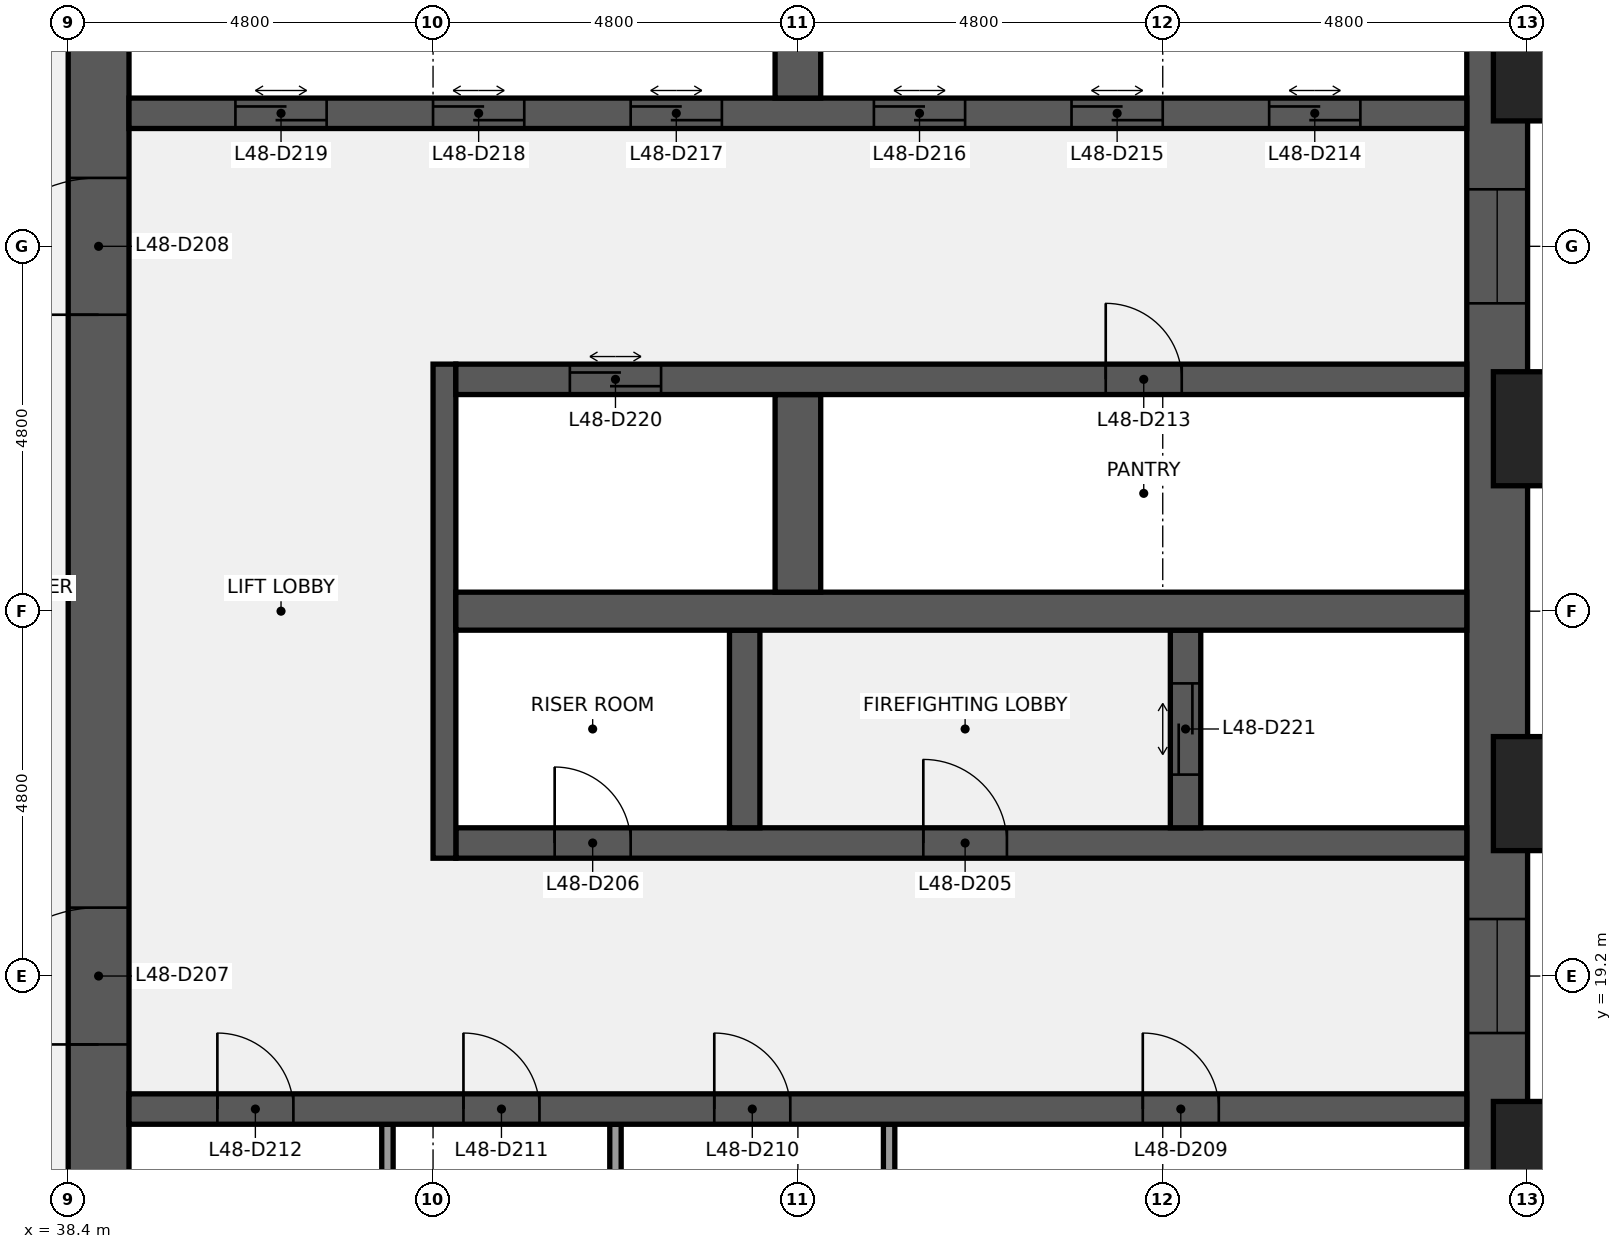
"""IFC4 building model, lengths in metres.
Left out: names, types, materials, properties, quantities, classifications, styles, units other than length and angle.
Written with IfcOpenShell. Run it as: python <this file> out.ifc"""

import sys

from ifc_helpers import new_model, si_unit, direction, frame, frame_2d, origin, origin_2d, place, context, subcontext, project, spatial, rectangle, extrude, element, fill, save


model = new_model("IFC4")
c1 = context("Model", 3, precision=1e-05, world=origin(), true_north=direction((0.0, 1.0)))
c2 = subcontext(c1, "Body", "Model", "MODEL_VIEW")
j1 = project(units=[si_unit("LENGTHUNIT", "METRE"), si_unit("PLANEANGLEUNIT", "RADIAN")], contexts=[c1])
p1 = place(None, origin())
s1 = spatial("IfcSite", under=j1, at=p1, CompositionType="ELEMENT")
p2 = place(p1, origin())
s2 = spatial("IfcBuilding", under=s1, at=p2, CompositionType="ELEMENT")
p3 = place(p2, frame((0.0, 0.0, 221.2)))
s3 = spatial("IfcBuildingStorey", under=s2, at=p3, CompositionType="ELEMENT", Elevation=221.2)
p4 = place(p3, frame((57.2, 38.4, 0.0), z_axis=(0.0, 0.0, 1.0), x_axis=(0.0, -1.0, 0.0)))
e1 = element("IfcWall", 1, at=p4, inside=s3, PredefinedType="SHEAR", context=c2, shape_type="SweptSolid", body=[
    extrude(rectangle(XDim=28.8, YDim=0.8, at=frame_2d((14.4, 0.0))), origin(), (0.0, 0.0, 1.0), 3.84),
])
p5 = place(p4, frame((18.45, 0.0, 0.9)))
e2 = element("IfcOpeningElement", 2, at=p5, cuts=e1, PredefinedType="OPENING", context=c2, shape_type="SweptSolid", body=[
    extrude(rectangle(XDim=1.5, YDim=1.5, at=frame_2d((0.75, 0.75))), frame((0.0, 0.41, 0.0), z_axis=(0.0, -1.0, 0.0), x_axis=(1.0, 0.0, 0.0)), (0.0, 0.0, 1.0), 0.82),
])
p6 = place(p4, frame((8.85, 0.0, 0.9)))
e3 = element("IfcOpeningElement", 3, at=p6, cuts=e1, PredefinedType="OPENING", context=c2, shape_type="SweptSolid", body=[
    extrude(rectangle(XDim=1.5, YDim=1.5, at=frame_2d((0.75, 0.75))), frame((0.0, 0.41, 0.0), z_axis=(0.0, -1.0, 0.0), x_axis=(1.0, 0.0, 0.0)), (0.0, 0.0, 1.0), 0.82),
])
p7 = place(p3, frame((38.8, 9.6, 0.0), z_axis=(0.0, 0.0, 1.0), x_axis=(0.0, 1.0, 0.0)))
e4 = element("IfcWall", 4, at=p7, inside=s3, PredefinedType="SHEAR", context=c2, shape_type="SweptSolid", body=[
    extrude(rectangle(XDim=28.8, YDim=0.8, at=frame_2d((14.4, 0.0))), origin(), (0.0, 0.0, 1.0), 3.84),
])
p8 = place(p7, frame((8.7, 0.0, 0.0)))
e5 = element("IfcOpeningElement", 5, at=p8, cuts=e4, PredefinedType="OPENING", context=c2, shape_type="SweptSolid", body=[
    extrude(rectangle(XDim=1.8, YDim=2.1, at=frame_2d((0.9, 1.05))), frame((0.0, 0.41, 0.0), z_axis=(0.0, -1.0, 0.0), x_axis=(1.0, 0.0, 0.0)), (0.0, 0.0, 1.0), 0.82),
])
p9 = place(p7, frame((18.3, 0.0, 0.0)))
e6 = element("IfcOpeningElement", 6, at=p9, cuts=e4, PredefinedType="OPENING", context=c2, shape_type="SweptSolid", body=[
    extrude(rectangle(XDim=1.8, YDim=2.1, at=frame_2d((0.9, 1.05))), frame((0.0, 0.41, 0.0), z_axis=(0.0, -1.0, 0.0), x_axis=(1.0, 0.0, 0.0)), (0.0, 0.0, 1.0), 0.82),
])
for number, where, z_axis, x_axis in (
    (7, (49.2, 14.65, 0.0), (0.0, 0.0, 1.0), (0.0, 1.0, 0.0)),
    (8, (45.6, 14.65, 0.0), (0.0, 0.0, 1.0), (0.0, 1.0, 0.0)),
    (9, (42.6, 14.65, 0.0), (0.0, 0.0, 1.0), (0.0, 1.0, 0.0)),
):
    element("IfcWall", number, at=place(p3, frame(where, z_axis=z_axis, x_axis=x_axis)), inside=s3, PredefinedType="PARTITIONING", context=c2, shape_type="SweptSolid", body=[
        extrude(rectangle(XDim=2.6, YDim=0.15, at=frame_2d((1.3, 0.0))), origin(), (0.0, 0.0, 1.0), 3.84),
    ])
p10 = place(p3, frame((39.2, 17.45, 0.0), z_axis=(0.0, 0.0, 1.0), x_axis=(1.0, 0.0, 0.0)))
e10 = element("IfcWall", 10, at=p10, inside=s3, PredefinedType="SHEAR", context=c2, shape_type="SweptSolid", body=[
    extrude(rectangle(XDim=17.6, YDim=0.4, at=frame_2d((8.8, 0.0))), origin(), (0.0, 0.0, 1.0), 3.84),
])
p11 = place(p10, frame((13.337, 0.0, 0.0)))
e11 = element("IfcOpeningElement", 11, at=p11, cuts=e10, PredefinedType="OPENING", context=c2, shape_type="SweptSolid", body=[
    extrude(rectangle(XDim=1.0, YDim=2.1, at=frame_2d((0.5, 1.05))), frame((0.0, 0.21, 0.0), z_axis=(0.0, -1.0, 0.0), x_axis=(1.0, 0.0, 0.0)), (0.0, 0.0, 1.0), 0.42),
])
p12 = place(p10, frame((7.7, 0.0, 0.0)))
e12 = element("IfcOpeningElement", 12, at=p12, cuts=e10, PredefinedType="OPENING", context=c2, shape_type="SweptSolid", body=[
    extrude(rectangle(XDim=1.0, YDim=2.1, at=frame_2d((0.5, 1.05))), frame((0.0, 0.21, 0.0), z_axis=(0.0, -1.0, 0.0), x_axis=(1.0, 0.0, 0.0)), (0.0, 0.0, 1.0), 0.42),
])
p13 = place(p10, frame((4.4, 0.0, 0.0)))
e13 = element("IfcOpeningElement", 13, at=p13, cuts=e10, PredefinedType="OPENING", context=c2, shape_type="SweptSolid", body=[
    extrude(rectangle(XDim=1.0, YDim=2.1, at=frame_2d((0.5, 1.05))), frame((0.0, 0.21, 0.0), z_axis=(0.0, -1.0, 0.0), x_axis=(1.0, 0.0, 0.0)), (0.0, 0.0, 1.0), 0.42),
])
p14 = place(p10, frame((1.163, 0.0, 0.0)))
e14 = element("IfcOpeningElement", 14, at=p14, cuts=e10, PredefinedType="OPENING", context=c2, shape_type="SweptSolid", body=[
    extrude(rectangle(XDim=1.0, YDim=2.1, at=frame_2d((0.5, 1.05))), frame((0.0, 0.21, 0.0), z_axis=(0.0, -1.0, 0.0), x_axis=(1.0, 0.0, 0.0)), (0.0, 0.0, 1.0), 0.42),
])
p15 = place(p3, frame((43.5, 20.95, 0.0), z_axis=(0.0, 0.0, 1.0), x_axis=(1.0, 0.0, 0.0)))
e15 = element("IfcWall", 15, at=p15, inside=s3, PredefinedType="SHEAR", context=c2, shape_type="SweptSolid", body=[
    extrude(rectangle(XDim=13.3, YDim=0.4, at=frame_2d((6.65, 0.0))), origin(), (0.0, 0.0, 1.0), 3.84),
])
p16 = place(p15, frame((6.15, 0.0, 0.0)))
e16 = element("IfcOpeningElement", 16, at=p16, cuts=e15, PredefinedType="OPENING", context=c2, shape_type="SweptSolid", body=[
    extrude(rectangle(XDim=1.1, YDim=2.1, at=frame_2d((0.55, 1.05))), frame((0.0, 0.21, 0.0), z_axis=(0.0, -1.0, 0.0), x_axis=(1.0, 0.0, 0.0)), (0.0, 0.0, 1.0), 0.42),
])
p17 = place(p15, frame((1.3, 0.0, 0.0)))
e17 = element("IfcOpeningElement", 17, at=p17, cuts=e15, PredefinedType="OPENING", context=c2, shape_type="SweptSolid", body=[
    extrude(rectangle(XDim=1.0, YDim=2.1, at=frame_2d((0.5, 1.05))), frame((0.0, 0.21, 0.0), z_axis=(0.0, -1.0, 0.0), x_axis=(1.0, 0.0, 0.0)), (0.0, 0.0, 1.0), 0.42),
])
p18 = place(p3, frame((43.35, 20.75, 0.0), z_axis=(0.0, 0.0, 1.0), x_axis=(0.0, 1.0, 0.0)))
e18 = element("IfcWall", 18, at=p18, inside=s3, PredefinedType="SHEAR", context=c2, shape_type="SweptSolid", body=[
    extrude(rectangle(XDim=6.5, YDim=0.3, at=frame_2d((3.25, 0.0))), origin(), (0.0, 0.0, 1.0), 3.84),
])
p19 = place(p3, frame((53.1, 21.15, 0.0), z_axis=(0.0, 0.0, 1.0), x_axis=(0.0, 1.0, 0.0)))
e19 = element("IfcWall", 19, at=p19, inside=s3, PredefinedType="SHEAR", context=c2, shape_type="SweptSolid", body=[
    extrude(rectangle(XDim=2.6, YDim=0.4, at=frame_2d((1.3, 0.0))), origin(), (0.0, 0.0, 1.0), 3.84),
])
p20 = place(p19, frame((0.7, 0.0, 0.0)))
e20 = element("IfcOpeningElement", 20, at=p20, cuts=e19, PredefinedType="OPENING", context=c2, shape_type="SweptSolid", body=[
    extrude(rectangle(XDim=1.2, YDim=2.1, at=frame_2d((0.6, 1.05))), frame((0.0, 0.21, 0.0), z_axis=(0.0, -1.0, 0.0), x_axis=(1.0, 0.0, 0.0)), (0.0, 0.0, 1.0), 0.42),
])
p21 = place(p3, frame((47.3, 21.15, 0.0), z_axis=(0.0, 0.0, 1.0), x_axis=(0.0, 1.0, 0.0)))
e21 = element("IfcWall", 21, at=p21, inside=s3, PredefinedType="SHEAR", context=c2, shape_type="SweptSolid", body=[
    extrude(rectangle(XDim=2.6, YDim=0.4, at=frame_2d((1.3, 0.0))), origin(), (0.0, 0.0, 1.0), 3.84),
])
p22 = place(p3, frame((43.5, 24.0, 0.0), z_axis=(0.0, 0.0, 1.0), x_axis=(1.0, 0.0, 0.0)))
e22 = element("IfcWall", 22, at=p22, inside=s3, PredefinedType="SHEAR", context=c2, shape_type="SweptSolid", body=[
    extrude(rectangle(XDim=13.3, YDim=0.5, at=frame_2d((6.65, 0.0))), origin(), (0.0, 0.0, 1.0), 3.84),
])
p23 = place(p3, frame((48.0, 24.25, 0.0), z_axis=(0.0, 0.0, 1.0), x_axis=(0.0, 1.0, 0.0)))
e23 = element("IfcWall", 23, at=p23, inside=s3, PredefinedType="SHEAR", context=c2, shape_type="SweptSolid", body=[
    extrude(rectangle(XDim=2.6, YDim=0.6, at=frame_2d((1.3, 0.0))), origin(), (0.0, 0.0, 1.0), 3.84),
])
p24 = place(p3, frame((43.5, 27.05, 0.0), z_axis=(0.0, 0.0, 1.0), x_axis=(1.0, 0.0, 0.0)))
e24 = element("IfcWall", 24, at=p24, inside=s3, PredefinedType="SHEAR", context=c2, shape_type="SweptSolid", body=[
    extrude(rectangle(XDim=13.3, YDim=0.4, at=frame_2d((6.65, 0.0))), origin(), (0.0, 0.0, 1.0), 3.84),
])
p25 = place(p24, frame((8.55, 0.0, 0.0)))
e25 = element("IfcOpeningElement", 25, at=p25, cuts=e24, PredefinedType="OPENING", context=c2, shape_type="SweptSolid", body=[
    extrude(rectangle(XDim=1.0, YDim=2.1, at=frame_2d((0.5, 1.05))), frame((0.0, 0.21, 0.0), z_axis=(0.0, -1.0, 0.0), x_axis=(1.0, 0.0, 0.0)), (0.0, 0.0, 1.0), 0.42),
])
p26 = place(p24, frame((1.5, 0.0, 0.0)))
e26 = element("IfcOpeningElement", 26, at=p26, cuts=e24, PredefinedType="OPENING", context=c2, shape_type="SweptSolid", body=[
    extrude(rectangle(XDim=1.2, YDim=2.1, at=frame_2d((0.6, 1.05))), frame((0.0, 0.21, 0.0), z_axis=(0.0, -1.0, 0.0), x_axis=(1.0, 0.0, 0.0)), (0.0, 0.0, 1.0), 0.42),
])
p27 = place(p3, frame((39.2, 30.55, 0.0), z_axis=(0.0, 0.0, 1.0), x_axis=(1.0, 0.0, 0.0)))
e27 = element("IfcWall", 27, at=p27, inside=s3, PredefinedType="SHEAR", context=c2, shape_type="SweptSolid", body=[
    extrude(rectangle(XDim=17.6, YDim=0.4, at=frame_2d((8.8, 0.0))), origin(), (0.0, 0.0, 1.0), 3.84),
])
p28 = place(p27, frame((15.0, 0.0, 0.0)))
e28 = element("IfcOpeningElement", 28, at=p28, cuts=e27, PredefinedType="OPENING", context=c2, shape_type="SweptSolid", body=[
    extrude(rectangle(XDim=1.2, YDim=2.1, at=frame_2d((0.6, 1.05))), frame((0.0, 0.21, 0.0), z_axis=(0.0, -1.0, 0.0), x_axis=(1.0, 0.0, 0.0)), (0.0, 0.0, 1.0), 0.42),
])
p29 = place(p27, frame((12.4, 0.0, 0.0)))
e29 = element("IfcOpeningElement", 29, at=p29, cuts=e27, PredefinedType="OPENING", context=c2, shape_type="SweptSolid", body=[
    extrude(rectangle(XDim=1.2, YDim=2.1, at=frame_2d((0.6, 1.05))), frame((0.0, 0.21, 0.0), z_axis=(0.0, -1.0, 0.0), x_axis=(1.0, 0.0, 0.0)), (0.0, 0.0, 1.0), 0.42),
])
p30 = place(p27, frame((9.8, 0.0, 0.0)))
e30 = element("IfcOpeningElement", 30, at=p30, cuts=e27, PredefinedType="OPENING", context=c2, shape_type="SweptSolid", body=[
    extrude(rectangle(XDim=1.2, YDim=2.1, at=frame_2d((0.6, 1.05))), frame((0.0, 0.21, 0.0), z_axis=(0.0, -1.0, 0.0), x_axis=(1.0, 0.0, 0.0)), (0.0, 0.0, 1.0), 0.42),
])
p31 = place(p27, frame((6.6, 0.0, 0.0)))
e31 = element("IfcOpeningElement", 31, at=p31, cuts=e27, PredefinedType="OPENING", context=c2, shape_type="SweptSolid", body=[
    extrude(rectangle(XDim=1.2, YDim=2.1, at=frame_2d((0.6, 1.05))), frame((0.0, 0.21, 0.0), z_axis=(0.0, -1.0, 0.0), x_axis=(1.0, 0.0, 0.0)), (0.0, 0.0, 1.0), 0.42),
])
p32 = place(p27, frame((4.0, 0.0, 0.0)))
e32 = element("IfcOpeningElement", 32, at=p32, cuts=e27, PredefinedType="OPENING", context=c2, shape_type="SweptSolid", body=[
    extrude(rectangle(XDim=1.2, YDim=2.1, at=frame_2d((0.6, 1.05))), frame((0.0, 0.21, 0.0), z_axis=(0.0, -1.0, 0.0), x_axis=(1.0, 0.0, 0.0)), (0.0, 0.0, 1.0), 0.42),
])
p33 = place(p27, frame((1.4, 0.0, 0.0)))
e33 = element("IfcOpeningElement", 33, at=p33, cuts=e27, PredefinedType="OPENING", context=c2, shape_type="SweptSolid", body=[
    extrude(rectangle(XDim=1.2, YDim=2.1, at=frame_2d((0.6, 1.05))), frame((0.0, 0.21, 0.0), z_axis=(0.0, -1.0, 0.0), x_axis=(1.0, 0.0, 0.0)), (0.0, 0.0, 1.0), 0.42),
])
p34 = place(p3, frame((48.0, 30.75, 0.0), z_axis=(0.0, 0.0, 1.0), x_axis=(0.0, 1.0, 0.0)))
e34 = element("IfcWall", 34, at=p34, inside=s3, PredefinedType="SHEAR", context=c2, shape_type="SweptSolid", body=[
    extrude(rectangle(XDim=2.6, YDim=0.6, at=frame_2d((1.3, 0.0))), origin(), (0.0, 0.0, 1.0), 3.84),
])
for number, where, z_axis, x_axis in (
    (35, (58.35, 16.8, 0.0), (0.0, 0.0, 1.0), (0.0, 1.0, 0.0)),
    (36, (58.35, 21.6, 0.0), (0.0, 0.0, 1.0), (0.0, 1.0, 0.0)),
    (37, (58.35, 26.4, 0.0), (0.0, 0.0, 1.0), (0.0, 1.0, 0.0)),
    (38, (58.35, 31.2, 0.0), (0.0, 0.0, 1.0), (0.0, 1.0, 0.0)),
):
    element("IfcColumn", number, at=place(p3, frame(where, z_axis=z_axis, x_axis=x_axis)), inside=s3, PredefinedType="PILASTER", context=c2, shape_type="SweptSolid", body=[
        extrude(rectangle(XDim=2.4, YDim=1.5, at=origin_2d()), origin(), (0.0, 0.0, 1.0), 4.0),
    ])
p35 = place(p16, origin())
e39 = element("IfcDoor", 39, at=p35, inside=s3, OperationType="SINGLE_SWING_LEFT", PredefinedType="DOOR", context=c2, shape_type="SweptSolid", body=[
    extrude(rectangle(XDim=1.1, YDim=2.1, at=frame_2d((0.55, 1.05))), frame((0.0, 0.025, 0.0), z_axis=(0.0, -1.0, 0.0), x_axis=(1.0, 0.0, 0.0)), (0.0, 0.0, 1.0), 0.05),
])
fill(e16, e39)
p36 = place(p17, origin())
e40 = element("IfcDoor", 40, at=p36, inside=s3, OperationType="SINGLE_SWING_LEFT", PredefinedType="DOOR", context=c2, shape_type="SweptSolid", body=[
    extrude(rectangle(XDim=1.0, YDim=2.1, at=frame_2d((0.5, 1.05))), frame((0.0, 0.025, 0.0), z_axis=(0.0, -1.0, 0.0), x_axis=(1.0, 0.0, 0.0)), (0.0, 0.0, 1.0), 0.05),
])
fill(e17, e40)
p37 = place(p8, origin())
e41 = element("IfcDoor", 41, at=p37, inside=s3, OperationType="DOUBLE_DOOR_SINGLE_SWING", PredefinedType="DOOR", context=c2, shape_type="SweptSolid", body=[
    extrude(rectangle(XDim=1.8, YDim=2.1, at=frame_2d((0.9, 1.05))), frame((0.0, 0.025, 0.0), z_axis=(0.0, -1.0, 0.0), x_axis=(1.0, 0.0, 0.0)), (0.0, 0.0, 1.0), 0.05),
])
fill(e5, e41)
p38 = place(p9, origin())
e42 = element("IfcDoor", 42, at=p38, inside=s3, OperationType="DOUBLE_DOOR_SINGLE_SWING", PredefinedType="DOOR", context=c2, shape_type="SweptSolid", body=[
    extrude(rectangle(XDim=1.8, YDim=2.1, at=frame_2d((0.9, 1.05))), frame((0.0, 0.025, 0.0), z_axis=(0.0, -1.0, 0.0), x_axis=(1.0, 0.0, 0.0)), (0.0, 0.0, 1.0), 0.05),
])
fill(e6, e42)
p39 = place(p11, origin())
e43 = element("IfcDoor", 43, at=p39, inside=s3, OperationType="SINGLE_SWING_LEFT", PredefinedType="DOOR", context=c2, shape_type="SweptSolid", body=[
    extrude(rectangle(XDim=1.0, YDim=2.1, at=frame_2d((0.5, 1.05))), frame((0.0, 0.025, 0.0), z_axis=(0.0, -1.0, 0.0), x_axis=(1.0, 0.0, 0.0)), (0.0, 0.0, 1.0), 0.05),
])
fill(e11, e43)
p40 = place(p12, origin())
e44 = element("IfcDoor", 44, at=p40, inside=s3, OperationType="SINGLE_SWING_LEFT", PredefinedType="DOOR", context=c2, shape_type="SweptSolid", body=[
    extrude(rectangle(XDim=1.0, YDim=2.1, at=frame_2d((0.5, 1.05))), frame((0.0, 0.025, 0.0), z_axis=(0.0, -1.0, 0.0), x_axis=(1.0, 0.0, 0.0)), (0.0, 0.0, 1.0), 0.05),
])
fill(e12, e44)
p41 = place(p13, origin())
e45 = element("IfcDoor", 45, at=p41, inside=s3, OperationType="SINGLE_SWING_LEFT", PredefinedType="DOOR", context=c2, shape_type="SweptSolid", body=[
    extrude(rectangle(XDim=1.0, YDim=2.1, at=frame_2d((0.5, 1.05))), frame((0.0, 0.025, 0.0), z_axis=(0.0, -1.0, 0.0), x_axis=(1.0, 0.0, 0.0)), (0.0, 0.0, 1.0), 0.05),
])
fill(e13, e45)
p42 = place(p14, origin())
e46 = element("IfcDoor", 46, at=p42, inside=s3, OperationType="SINGLE_SWING_LEFT", PredefinedType="DOOR", context=c2, shape_type="SweptSolid", body=[
    extrude(rectangle(XDim=1.0, YDim=2.1, at=frame_2d((0.5, 1.05))), frame((0.0, 0.025, 0.0), z_axis=(0.0, -1.0, 0.0), x_axis=(1.0, 0.0, 0.0)), (0.0, 0.0, 1.0), 0.05),
])
fill(e14, e46)
p43 = place(p25, origin())
e47 = element("IfcDoor", 47, at=p43, inside=s3, OperationType="SINGLE_SWING_LEFT", PredefinedType="DOOR", context=c2, shape_type="SweptSolid", body=[
    extrude(rectangle(XDim=1.0, YDim=2.1, at=frame_2d((0.5, 1.05))), frame((0.0, 0.025, 0.0), z_axis=(0.0, -1.0, 0.0), x_axis=(1.0, 0.0, 0.0)), (0.0, 0.0, 1.0), 0.05),
])
fill(e25, e47)
p44 = place(p28, origin())
e48 = element("IfcDoor", 48, at=p44, inside=s3, OperationType="DOUBLE_DOOR_SLIDING", PredefinedType="DOOR", context=c2, shape_type="SweptSolid", body=[
    extrude(rectangle(XDim=1.2, YDim=2.1, at=frame_2d((0.6, 1.05))), frame((0.0, 0.025, 0.0), z_axis=(0.0, -1.0, 0.0), x_axis=(1.0, 0.0, 0.0)), (0.0, 0.0, 1.0), 0.05),
])
fill(e28, e48)
p45 = place(p29, origin())
e49 = element("IfcDoor", 49, at=p45, inside=s3, OperationType="DOUBLE_DOOR_SLIDING", PredefinedType="DOOR", context=c2, shape_type="SweptSolid", body=[
    extrude(rectangle(XDim=1.2, YDim=2.1, at=frame_2d((0.6, 1.05))), frame((0.0, 0.025, 0.0), z_axis=(0.0, -1.0, 0.0), x_axis=(1.0, 0.0, 0.0)), (0.0, 0.0, 1.0), 0.05),
])
fill(e29, e49)
p46 = place(p30, origin())
e50 = element("IfcDoor", 50, at=p46, inside=s3, OperationType="DOUBLE_DOOR_SLIDING", PredefinedType="DOOR", context=c2, shape_type="SweptSolid", body=[
    extrude(rectangle(XDim=1.2, YDim=2.1, at=frame_2d((0.6, 1.05))), frame((0.0, 0.025, 0.0), z_axis=(0.0, -1.0, 0.0), x_axis=(1.0, 0.0, 0.0)), (0.0, 0.0, 1.0), 0.05),
])
fill(e30, e50)
p47 = place(p31, origin())
e51 = element("IfcDoor", 51, at=p47, inside=s3, OperationType="DOUBLE_DOOR_SLIDING", PredefinedType="DOOR", context=c2, shape_type="SweptSolid", body=[
    extrude(rectangle(XDim=1.2, YDim=2.1, at=frame_2d((0.6, 1.05))), frame((0.0, 0.025, 0.0), z_axis=(0.0, -1.0, 0.0), x_axis=(1.0, 0.0, 0.0)), (0.0, 0.0, 1.0), 0.05),
])
fill(e31, e51)
p48 = place(p32, origin())
e52 = element("IfcDoor", 52, at=p48, inside=s3, OperationType="DOUBLE_DOOR_SLIDING", PredefinedType="DOOR", context=c2, shape_type="SweptSolid", body=[
    extrude(rectangle(XDim=1.2, YDim=2.1, at=frame_2d((0.6, 1.05))), frame((0.0, 0.025, 0.0), z_axis=(0.0, -1.0, 0.0), x_axis=(1.0, 0.0, 0.0)), (0.0, 0.0, 1.0), 0.05),
])
fill(e32, e52)
p49 = place(p33, origin())
e53 = element("IfcDoor", 53, at=p49, inside=s3, OperationType="DOUBLE_DOOR_SLIDING", PredefinedType="DOOR", context=c2, shape_type="SweptSolid", body=[
    extrude(rectangle(XDim=1.2, YDim=2.1, at=frame_2d((0.6, 1.05))), frame((0.0, 0.025, 0.0), z_axis=(0.0, -1.0, 0.0), x_axis=(1.0, 0.0, 0.0)), (0.0, 0.0, 1.0), 0.05),
])
fill(e33, e53)
p50 = place(p26, origin())
e54 = element("IfcDoor", 54, at=p50, inside=s3, OperationType="DOUBLE_DOOR_SLIDING", PredefinedType="DOOR", context=c2, shape_type="SweptSolid", body=[
    extrude(rectangle(XDim=1.2, YDim=2.1, at=frame_2d((0.6, 1.05))), frame((0.0, 0.025, 0.0), z_axis=(0.0, -1.0, 0.0), x_axis=(1.0, 0.0, 0.0)), (0.0, 0.0, 1.0), 0.05),
])
fill(e26, e54)
p51 = place(p20, origin())
e55 = element("IfcDoor", 55, at=p51, inside=s3, OperationType="DOUBLE_DOOR_SLIDING", PredefinedType="DOOR", context=c2, shape_type="SweptSolid", body=[
    extrude(rectangle(XDim=1.2, YDim=2.1, at=frame_2d((0.6, 1.05))), frame((0.0, 0.025, 0.0), z_axis=(0.0, -1.0, 0.0), x_axis=(1.0, 0.0, 0.0)), (0.0, 0.0, 1.0), 0.05),
])
fill(e20, e55)
p52 = place(p5, origin())
e56 = element("IfcWindow", 56, at=p52, inside=s3, PartitioningType="SINGLE_PANEL", PredefinedType="WINDOW", context=c2, shape_type="SweptSolid", body=[
    extrude(rectangle(XDim=1.5, YDim=1.5, at=frame_2d((0.75, 0.75))), frame((0.0, 0.03, 0.0), z_axis=(0.0, -1.0, 0.0), x_axis=(1.0, 0.0, 0.0)), (0.0, 0.0, 1.0), 0.06),
])
fill(e2, e56)
p53 = place(p6, origin())
e57 = element("IfcWindow", 57, at=p53, inside=s3, PartitioningType="SINGLE_PANEL", PredefinedType="WINDOW", context=c2, shape_type="SweptSolid", body=[
    extrude(rectangle(XDim=1.5, YDim=1.5, at=frame_2d((0.75, 0.75))), frame((0.0, 0.03, 0.0), z_axis=(0.0, -1.0, 0.0), x_axis=(1.0, 0.0, 0.0)), (0.0, 0.0, 1.0), 0.06),
])
fill(e3, e57)
save(model, sys.argv[1])
